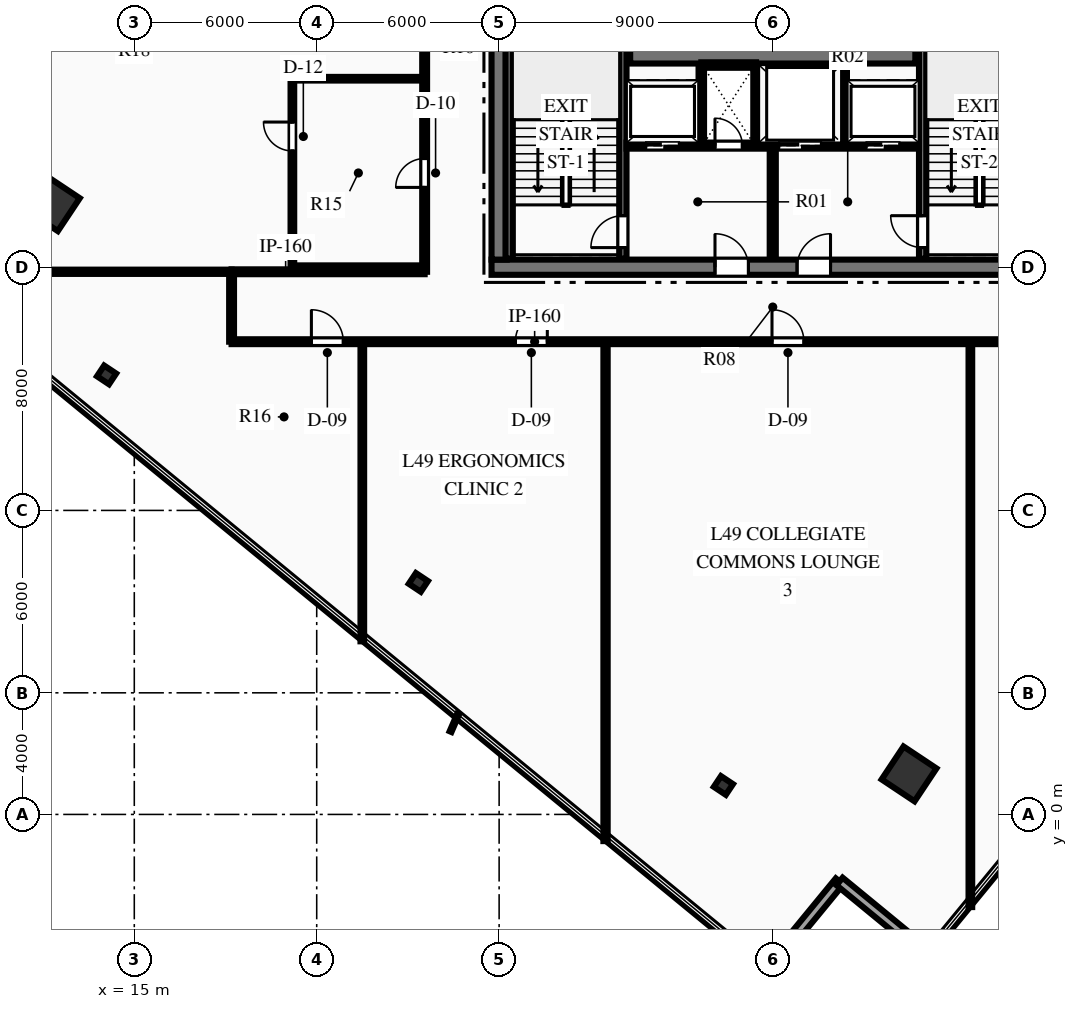
"""IFC4 building model, lengths in metres.
Left out: names, types, materials, properties, quantities, classifications, styles, units other than length and angle.
Written with IfcOpenShell. Run it as: python <this file> out.ifc"""

import sys

from ifc_helpers import new_model, si_unit, direction, frame, frame_2d, origin, origin_2d, place, context, subcontext, project, spatial, rectangle, hollow_rectangle, i_section, extrude, element, fill, save


model = new_model("IFC4")
c1 = context("Model", 3, precision=1e-05, world=origin(), true_north=direction((0.0, 1.0)))
c2 = subcontext(c1, "Body", "Model", "MODEL_VIEW")
j1 = project(units=[si_unit("LENGTHUNIT", "METRE"), si_unit("PLANEANGLEUNIT", "RADIAN")], contexts=[c1])
p1 = place(None, origin())
s1 = spatial("IfcSite", under=j1, at=p1, CompositionType="ELEMENT")
p2 = place(p1, origin())
s2 = spatial("IfcBuilding", under=s1, at=p2, CompositionType="ELEMENT")
p3 = place(p2, frame((0.0, 0.0, 198.45)))
s3 = spatial("IfcBuildingStorey", under=s2, at=p3, CompositionType="ELEMENT", Elevation=198.45)
p4 = place(p3, frame((26.75, 18.0, 0.0), z_axis=(0.0, 0.0, 1.0), x_axis=(1.0, 0.0, 0.0)))
e1 = element("IfcWall", 1, at=p4, inside=s3, PredefinedType="SHEAR", context=c2, shape_type="SweptSolid", body=[
    extrude(rectangle(XDim=18.5, YDim=0.5, at=frame_2d((9.25, 0.0))), origin(), (0.0, 0.0, 1.0), 3.75),
])
p5 = place(p4, frame((7.35, 0.0, 0.0)))
e2 = element("IfcOpeningElement", 2, at=p5, cuts=e1, PredefinedType="OPENING", context=c2, shape_type="SweptSolid", body=[
    extrude(rectangle(XDim=1.1, YDim=2.15, at=frame_2d((0.55, 1.075))), frame((0.0, 0.26, 0.0), z_axis=(0.0, -1.0, 0.0), x_axis=(1.0, 0.0, 0.0)), (0.0, 0.0, 1.0), 0.52),
])
p6 = place(p4, frame((10.05, 0.0, 0.0)))
e3 = element("IfcOpeningElement", 3, at=p6, cuts=e1, PredefinedType="OPENING", context=c2, shape_type="SweptSolid", body=[
    extrude(rectangle(XDim=1.1, YDim=2.15, at=frame_2d((0.55, 1.075))), frame((0.0, 0.26, 0.0), z_axis=(0.0, -1.0, 0.0), x_axis=(1.0, 0.0, 0.0)), (0.0, 0.0, 1.0), 0.52),
])
p7 = place(p3, frame((27.0, 18.25, 0.0), z_axis=(0.0, 0.0, 1.0), x_axis=(0.0, 1.0, 0.0)))
e4 = element("IfcWall", 4, at=p7, inside=s3, PredefinedType="SHEAR", context=c2, shape_type="SweptSolid", body=[
    extrude(rectangle(XDim=15.5, YDim=0.5, at=frame_2d((7.75, 0.0))), origin(), (0.0, 0.0, 1.0), 3.75),
])
p8 = place(p7, frame((9.99, 0.0, 0.0)))
e5 = element("IfcOpeningElement", 5, at=p8, cuts=e4, PredefinedType="OPENING", context=c2, shape_type="SweptSolid", body=[
    extrude(rectangle(XDim=1.4, YDim=2.2, at=frame_2d((0.7, 1.1))), frame((0.0, 0.26, 0.0), z_axis=(0.0, -1.0, 0.0), x_axis=(1.0, 0.0, 0.0)), (0.0, 0.0, 1.0), 0.52),
])
p9 = place(p3, frame((31.31, 24.95, 0.0), z_axis=(0.0, 0.0, 1.0), x_axis=(1.0, 0.0, 0.0)))
e6 = element("IfcWall", 6, at=p9, inside=s3, PredefinedType="SHEAR", context=c2, shape_type="SweptSolid", body=[
    extrude(rectangle(XDim=9.38, YDim=0.5, at=frame_2d((4.69, 0.0))), origin(), (0.0, 0.0, 1.0), 3.75),
])
p10 = place(p3, frame((31.07, 18.28, 0.0), z_axis=(0.0, 0.0, 1.0), x_axis=(0.0, 1.0, 0.0)))
e7 = element("IfcWall", 7, at=p10, inside=s3, PredefinedType="SHEAR", context=c2, shape_type="SweptSolid", body=[
    extrude(rectangle(XDim=8.26, YDim=0.24, at=frame_2d((4.13, 0.0))), origin(), (0.0, 0.0, 1.0), 3.75),
])
p11 = place(p10, frame((0.365, 0.0, 0.0)))
e8 = element("IfcOpeningElement", 8, at=p11, cuts=e7, PredefinedType="OPENING", context=c2, shape_type="SweptSolid", body=[
    extrude(rectangle(XDim=1.05, YDim=2.15, at=frame_2d((0.525, 1.075))), frame((0.0, 0.13, 0.0), z_axis=(0.0, -1.0, 0.0), x_axis=(1.0, 0.0, 0.0)), (0.0, 0.0, 1.0), 0.26),
])
p12 = place(p3, frame((27.33, 18.28, 0.0), z_axis=(0.0, 0.0, 1.0), x_axis=(0.0, 1.0, 0.0)))
e9 = element("IfcWall", 9, at=p12, inside=s3, PredefinedType="SHEAR", context=c2, shape_type="SweptSolid", body=[
    extrude(rectangle(XDim=8.26, YDim=0.24, at=frame_2d((4.13, 0.0))), origin(), (0.0, 0.0, 1.0), 3.75),
])
p13 = place(p3, frame((40.93, 18.28, 0.0), z_axis=(0.0, 0.0, 1.0), x_axis=(0.0, 1.0, 0.0)))
e10 = element("IfcWall", 10, at=p13, inside=s3, PredefinedType="SHEAR", context=c2, shape_type="SweptSolid", body=[
    extrude(rectangle(XDim=8.26, YDim=0.24, at=frame_2d((4.13, 0.0))), origin(), (0.0, 0.0, 1.0), 3.75),
])
p14 = place(p13, frame((0.365, 0.0, 0.0)))
e11 = element("IfcOpeningElement", 11, at=p14, cuts=e10, PredefinedType="OPENING", context=c2, shape_type="SweptSolid", body=[
    extrude(rectangle(XDim=1.05, YDim=2.15, at=frame_2d((0.525, 1.075))), frame((0.0, 0.13, 0.0), z_axis=(0.0, -1.0, 0.0), x_axis=(1.0, 0.0, 0.0)), (0.0, 0.0, 1.0), 0.26),
])
for number, where, z_axis, x_axis in (
    (12, (40.483, 1.333, 0.0), (0.0, 0.0, 1.0), (0.554, 0.832, 0.0)),
    (13, (12.305, 20.09, 0.0), (0.0, 0.0, 1.0), (0.554, 0.832, 0.0)),
):
    element("IfcColumn", number, at=place(p3, frame(where, z_axis=z_axis, x_axis=x_axis)), inside=s3, PredefinedType="COLUMN", context=c2, shape_type="SweptSolid", body=[
        extrude(hollow_rectangle(XDim=1.3, YDim=1.3, WallThickness=0.06, at=origin_2d()), origin(), (0.0, 0.0, 1.0), 3.75),
    ])
for number, where, z_axis, x_axis in (
    (14, (14.088, 14.458, 0.0), (0.0, 0.0, 1.0), (0.554, 0.832, 0.0)),
    (15, (24.343, 7.631, 0.0), (0.0, 0.0, 1.0), (0.554, 0.832, 0.0)),
    (16, (34.377, 0.952, 0.0), (0.0, 0.0, 1.0), (0.554, 0.832, 0.0)),
):
    element("IfcColumn", number, at=place(p3, frame(where, z_axis=z_axis, x_axis=x_axis)), inside=s3, PredefinedType="COLUMN", context=c2, shape_type="SweptSolid", body=[
        extrude(i_section(OverallWidth=0.424, OverallDepth=0.474, WebThickness=0.048, FlangeThickness=0.077, at=origin_2d()), origin(), (0.0, 0.0, 1.0), 3.75),
    ])
p15 = place(p3, frame((38.197, -2.205, 0.0), z_axis=(0.0, 0.0, 1.0), x_axis=(-0.634743428491, -0.772722964579, 0.0)))
e17 = element("IfcWall", 17, at=p15, inside=s3, PredefinedType="STANDARD", context=c2, shape_type="SweptSolid", body=[
    extrude(rectangle(XDim=3.9, YDim=0.32, at=frame_2d((1.95, 0.0))), origin(), (0.0, 0.0, 1.0), 3.47),
])
p16 = place(p3, frame((41.211, -4.68, 0.0), z_axis=(0.0, 0.0, 1.0), x_axis=(-0.77274818591, 0.634712723343, 0.0)))
e18 = element("IfcWall", 18, at=p16, inside=s3, PredefinedType="STANDARD", context=c2, shape_type="SweptSolid", body=[
    extrude(rectangle(XDim=3.9, YDim=0.32, at=frame_2d((1.95, 0.0))), origin(), (0.0, 0.0, 1.0), 3.47),
])
p17 = place(p3, frame((36.0, 18.28, 0.0), z_axis=(0.0, 0.0, 1.0), x_axis=(0.0, 1.0, 0.0)))
e19 = element("IfcWall", 19, at=p17, inside=s3, PredefinedType="PARTITIONING", context=c2, shape_type="SweptSolid", body=[
    extrude(rectangle(XDim=3.77, YDim=0.2, at=frame_2d((1.885, 0.0))), origin(), (0.0, 0.0, 1.0), 3.47),
])
p18 = place(p3, frame((31.19, 22.0, 0.0), z_axis=(0.0, 0.0, 1.0), x_axis=(1.0, 0.0, 0.0)))
e20 = element("IfcWall", 20, at=p18, inside=s3, PredefinedType="PARTITIONING", context=c2, shape_type="SweptSolid", body=[
    extrude(rectangle(XDim=4.69, YDim=0.2, at=frame_2d((2.345, 0.0))), origin(), (0.0, 0.0, 1.0), 3.47),
])
p19 = place(p18, frame((2.91, 0.0, 0.0)))
e21 = element("IfcOpeningElement", 21, at=p19, cuts=e20, PredefinedType="OPENING", context=c2, shape_type="SweptSolid", body=[
    extrude(rectangle(XDim=0.9, YDim=2.15, at=frame_2d((0.45, 1.075))), frame((0.0, 0.11, 0.0), z_axis=(0.0, -1.0, 0.0), x_axis=(1.0, 0.0, 0.0)), (0.0, 0.0, 1.0), 0.22),
])
p20 = place(p18, frame((0.635, 0.0, 0.0)))
e22 = element("IfcOpeningElement", 22, at=p20, cuts=e20, PredefinedType="OPENING", context=c2, shape_type="SweptSolid", body=[
    extrude(rectangle(XDim=1.1, YDim=2.15, at=frame_2d((0.55, 1.075))), frame((0.0, 0.11, 0.0), z_axis=(0.0, -1.0, 0.0), x_axis=(1.0, 0.0, 0.0)), (0.0, 0.0, 1.0), 0.22),
])
p21 = place(p3, frame((36.12, 22.0, 0.0), z_axis=(0.0, 0.0, 1.0), x_axis=(1.0, 0.0, 0.0)))
e23 = element("IfcWall", 23, at=p21, inside=s3, PredefinedType="PARTITIONING", context=c2, shape_type="SweptSolid", body=[
    extrude(rectangle(XDim=4.69, YDim=0.2, at=frame_2d((2.345, 0.0))), origin(), (0.0, 0.0, 1.0), 3.47),
])
p22 = place(p21, frame((2.955, 0.0, 0.0)))
e24 = element("IfcOpeningElement", 24, at=p22, cuts=e23, PredefinedType="OPENING", context=c2, shape_type="SweptSolid", body=[
    extrude(rectangle(XDim=1.1, YDim=2.15, at=frame_2d((0.55, 1.075))), frame((0.0, 0.11, 0.0), z_axis=(0.0, -1.0, 0.0), x_axis=(1.0, 0.0, 0.0)), (0.0, 0.0, 1.0), 0.22),
])
p23 = place(p21, frame((0.08, 0.0, 0.0)))
e25 = element("IfcOpeningElement", 25, at=p23, cuts=e23, PredefinedType="OPENING", context=c2, shape_type="SweptSolid", body=[
    extrude(rectangle(XDim=1.4, YDim=2.2, at=frame_2d((0.7, 1.1))), frame((0.0, 0.11, 0.0), z_axis=(0.0, -1.0, 0.0), x_axis=(1.0, 0.0, 0.0)), (0.0, 0.0, 1.0), 0.22),
])
for number, where, z_axis, x_axis in (
    (26, (33.65, 22.05, 0.0), (0.0, 0.0, 1.0), (0.0, 1.0, 0.0)),
    (27, (35.45, 22.05, 0.0), (0.0, 0.0, 1.0), (0.0, 1.0, 0.0)),
):
    element("IfcWall", number, at=place(p3, frame(where, z_axis=z_axis, x_axis=x_axis)), inside=s3, PredefinedType="PARTITIONING", context=c2, shape_type="SweptSolid", body=[
        extrude(rectangle(XDim=2.6, YDim=0.18, at=frame_2d((1.3, 0.0))), origin(), (0.0, 0.0, 1.0), 3.47),
    ])
p24 = place(p3, frame((33.65, 24.65, 0.0), z_axis=(0.0, 0.0, 1.0), x_axis=(1.0, 0.0, 0.0)))
e28 = element("IfcWall", 28, at=p24, inside=s3, PredefinedType="PARTITIONING", context=c2, shape_type="SweptSolid", body=[
    extrude(rectangle(XDim=1.8, YDim=0.18, at=frame_2d((0.9, 0.0))), origin(), (0.0, 0.0, 1.0), 3.47),
])
p25 = place(p3, frame((38.35, 22.05, 0.0), z_axis=(0.0, 0.0, 1.0), x_axis=(0.0, 1.0, 0.0)))
e29 = element("IfcWall", 29, at=p25, inside=s3, PredefinedType="PARTITIONING", context=c2, shape_type="SweptSolid", body=[
    extrude(rectangle(XDim=2.6, YDim=0.18, at=frame_2d((1.3, 0.0))), origin(), (0.0, 0.0, 1.0), 3.47),
])
p26 = place(p3, frame((18.2, 15.55, 0.0), z_axis=(0.0, 0.0, 1.0), x_axis=(1.0, 0.0, 0.0)))
e30 = element("IfcWall", 30, at=p26, inside=s3, PredefinedType="PARTITIONING", context=c2, shape_type="SweptSolid", body=[
    extrude(rectangle(XDim=35.6, YDim=0.16, at=frame_2d((17.8, 0.0))), origin(), (0.0, 0.0, 1.0), 2.849),
])
p27 = place(p26, frame((2.625, 0.0, 0.0)))
e31 = element("IfcOpeningElement", 31, at=p27, cuts=e30, PredefinedType="OPENING", context=c2, shape_type="SweptSolid", body=[
    extrude(rectangle(XDim=1.05, YDim=2.15, at=frame_2d((0.525, 1.075))), frame((0.0, 0.09, 0.0), z_axis=(0.0, -1.0, 0.0), x_axis=(1.0, 0.0, 0.0)), (0.0, 0.0, 1.0), 0.18),
])
p28 = place(p26, frame((9.335, 0.0, 0.0)))
e32 = element("IfcOpeningElement", 32, at=p28, cuts=e30, PredefinedType="OPENING", context=c2, shape_type="SweptSolid", body=[
    extrude(rectangle(XDim=1.05, YDim=2.15, at=frame_2d((0.525, 1.075))), frame((0.0, 0.09, 0.0), z_axis=(0.0, -1.0, 0.0), x_axis=(1.0, 0.0, 0.0)), (0.0, 0.0, 1.0), 0.18),
])
p29 = place(p26, frame((17.775, 0.0, 0.0)))
e33 = element("IfcOpeningElement", 33, at=p29, cuts=e30, PredefinedType="OPENING", context=c2, shape_type="SweptSolid", body=[
    extrude(rectangle(XDim=1.05, YDim=2.15, at=frame_2d((0.525, 1.075))), frame((0.0, 0.09, 0.0), z_axis=(0.0, -1.0, 0.0), x_axis=(1.0, 0.0, 0.0)), (0.0, 0.0, 1.0), 0.18),
])
p30 = place(p26, frame((26.055, 0.0, 0.0)))
e34 = element("IfcOpeningElement", 34, at=p30, cuts=e30, PredefinedType="OPENING", context=c2, shape_type="SweptSolid", body=[
    extrude(rectangle(XDim=1.05, YDim=2.15, at=frame_2d((0.525, 1.075))), frame((0.0, 0.09, 0.0), z_axis=(0.0, -1.0, 0.0), x_axis=(1.0, 0.0, 0.0)), (0.0, 0.0, 1.0), 0.18),
])
p31 = place(p26, frame((32.265, 0.0, 0.0)))
e35 = element("IfcOpeningElement", 35, at=p31, cuts=e30, PredefinedType="OPENING", context=c2, shape_type="SweptSolid", body=[
    extrude(rectangle(XDim=1.05, YDim=2.15, at=frame_2d((0.525, 1.075))), frame((0.0, 0.09, 0.0), z_axis=(0.0, -1.0, 0.0), x_axis=(1.0, 0.0, 0.0)), (0.0, 0.0, 1.0), 0.18),
])
p32 = place(p3, frame((18.2, 17.85, 0.0), z_axis=(0.0, 0.0, 1.0), x_axis=(1.0, 0.0, 0.0)))
e36 = element("IfcWall", 36, at=p32, inside=s3, PredefinedType="PARTITIONING", context=c2, shape_type="SweptSolid", body=[
    extrude(rectangle(XDim=6.35, YDim=0.16, at=frame_2d((3.175, 0.0))), origin(), (0.0, 0.0, 1.0), 3.47),
])
p33 = place(p3, frame((24.55, 17.85, 0.0), z_axis=(0.0, 0.0, 1.0), x_axis=(0.0, 1.0, 0.0)))
e37 = element("IfcWall", 37, at=p33, inside=s3, PredefinedType="PARTITIONING", context=c2, shape_type="SweptSolid", body=[
    extrude(rectangle(XDim=16.3, YDim=0.16, at=frame_2d((8.15, 0.0))), origin(), (0.0, 0.0, 1.0), 3.47),
])
p34 = place(p33, frame((2.775, 0.0, 0.0)))
e38 = element("IfcOpeningElement", 38, at=p34, cuts=e37, PredefinedType="OPENING", context=c2, shape_type="SweptSolid", body=[
    extrude(rectangle(XDim=0.95, YDim=2.15, at=frame_2d((0.475, 1.075))), frame((0.0, 0.09, 0.0), z_axis=(0.0, -1.0, 0.0), x_axis=(1.0, 0.0, 0.0)), (0.0, 0.0, 1.0), 0.18),
])
p35 = place(p33, frame((8.729, 0.0, 0.0)))
e39 = element("IfcOpeningElement", 39, at=p35, cuts=e37, PredefinedType="OPENING", context=c2, shape_type="SweptSolid", body=[
    extrude(rectangle(XDim=1.05, YDim=2.15, at=frame_2d((0.525, 1.075))), frame((0.0, 0.09, 0.0), z_axis=(0.0, -1.0, 0.0), x_axis=(1.0, 0.0, 0.0)), (0.0, 0.0, 1.0), 0.18),
])
p36 = place(p3, frame((18.2, 15.55, 0.0), z_axis=(0.0, 0.0, 1.0), x_axis=(0.0, 1.0, 0.0)))
e40 = element("IfcWall", 40, at=p36, inside=s3, PredefinedType="PARTITIONING", context=c2, shape_type="SweptSolid", body=[
    extrude(rectangle(XDim=2.3, YDim=0.16, at=frame_2d((1.15, 0.0))), origin(), (0.0, 0.0, 1.0), 3.47),
])
p37 = place(p3, frame((7.701, 17.85, 0.0), z_axis=(0.0, 0.0, 1.0), x_axis=(1.0, 0.0, 0.0)))
e41 = element("IfcWall", 41, at=p37, inside=s3, PredefinedType="PARTITIONING", context=c2, shape_type="SweptSolid", body=[
    extrude(rectangle(XDim=10.499, YDim=0.14, at=frame_2d((5.25, 0.0))), origin(), (0.0, 0.0, 1.0), 3.47),
])
p38 = place(p3, frame((22.5, 5.694, 0.0), z_axis=(0.0, 0.0, 1.0), x_axis=(0.0, 1.0, 0.0)))
e42 = element("IfcWall", 42, at=p38, inside=s3, PredefinedType="PARTITIONING", context=c2, shape_type="SweptSolid", body=[
    extrude(rectangle(XDim=9.856, YDim=0.12, at=frame_2d((4.928, 0.0))), origin(), (0.0, 0.0, 1.0), 3.47),
])
p39 = place(p3, frame((30.5, -0.877, 0.0), z_axis=(0.0, 0.0, 1.0), x_axis=(0.0, 1.0, 0.0)))
e43 = element("IfcWall", 43, at=p39, inside=s3, PredefinedType="PARTITIONING", context=c2, shape_type="SweptSolid", body=[
    extrude(rectangle(XDim=16.427, YDim=0.14, at=frame_2d((8.214, 0.0))), origin(), (0.0, 0.0, 1.0), 3.47),
])
p40 = place(p3, frame((42.5, -3.047, 0.0), z_axis=(0.0, 0.0, 1.0), x_axis=(0.0, 1.0, 0.0)))
e44 = element("IfcWall", 44, at=p40, inside=s3, PredefinedType="PARTITIONING", context=c2, shape_type="SweptSolid", body=[
    extrude(rectangle(XDim=18.597, YDim=0.12, at=frame_2d((9.299, 0.0))), origin(), (0.0, 0.0, 1.0), 3.47),
])
p41 = place(p3, frame((20.2, 18.0, 0.0), z_axis=(0.0, 0.0, 1.0), x_axis=(1.0, 0.0, 0.0)))
e45 = element("IfcWall", 45, at=p41, inside=s3, PredefinedType="PARTITIONING", context=c2, shape_type="SweptSolid", body=[
    extrude(rectangle(XDim=4.35, YDim=0.12, at=frame_2d((2.175, 0.0))), origin(), (0.0, 0.0, 1.0), 3.47),
])
p42 = place(p3, frame((20.2, 18.0, 0.0), z_axis=(0.0, 0.0, 1.0), x_axis=(0.0, 1.0, 0.0)))
e46 = element("IfcWall", 46, at=p42, inside=s3, PredefinedType="PARTITIONING", context=c2, shape_type="SweptSolid", body=[
    extrude(rectangle(XDim=6.2, YDim=0.12, at=frame_2d((3.1, 0.0))), origin(), (0.0, 0.0, 1.0), 3.47),
])
p43 = place(p42, frame((3.825, 0.0, 0.0)))
e47 = element("IfcOpeningElement", 47, at=p43, cuts=e46, PredefinedType="OPENING", context=c2, shape_type="SweptSolid", body=[
    extrude(rectangle(XDim=0.95, YDim=2.15, at=frame_2d((0.475, 1.075))), frame((0.0, 0.07, 0.0), z_axis=(0.0, -1.0, 0.0), x_axis=(1.0, 0.0, 0.0)), (0.0, 0.0, 1.0), 0.14),
])
p44 = place(p3, frame((20.2, 24.2, 0.0), z_axis=(0.0, 0.0, 1.0), x_axis=(1.0, 0.0, 0.0)))
e48 = element("IfcWall", 48, at=p44, inside=s3, PredefinedType="PARTITIONING", context=c2, shape_type="SweptSolid", body=[
    extrude(rectangle(XDim=4.35, YDim=0.12, at=frame_2d((2.175, 0.0))), origin(), (0.0, 0.0, 1.0), 3.47),
])
p45 = place(p11, origin())
e49 = element("IfcDoor", 49, at=p45, inside=s3, OperationType="SINGLE_SWING_LEFT", PredefinedType="DOOR", context=c2, shape_type="SweptSolid", body=[
    extrude(rectangle(XDim=1.05, YDim=2.15, at=frame_2d((0.525, 1.075))), frame((0.0, 0.025, 0.0), z_axis=(0.0, -1.0, 0.0), x_axis=(1.0, 0.0, 0.0)), (0.0, 0.0, 1.0), 0.05),
])
fill(e8, e49)
p46 = place(p14, origin())
e50 = element("IfcDoor", 50, at=p46, inside=s3, OperationType="SINGLE_SWING_RIGHT", PredefinedType="DOOR", context=c2, shape_type="SweptSolid", body=[
    extrude(rectangle(XDim=1.05, YDim=2.15, at=frame_2d((0.525, 1.075))), frame((0.0, 0.025, 0.0), z_axis=(0.0, -1.0, 0.0), x_axis=(1.0, 0.0, 0.0)), (0.0, 0.0, 1.0), 0.05),
])
fill(e11, e50)
p47 = place(p5, origin())
e51 = element("IfcDoor", 51, at=p47, inside=s3, OperationType="SINGLE_SWING_LEFT", PredefinedType="DOOR", context=c2, shape_type="SweptSolid", body=[
    extrude(rectangle(XDim=1.1, YDim=2.15, at=frame_2d((0.55, 1.075))), frame((0.0, 0.025, 0.0), z_axis=(0.0, -1.0, 0.0), x_axis=(1.0, 0.0, 0.0)), (0.0, 0.0, 1.0), 0.05),
])
fill(e2, e51)
p48 = place(p6, origin())
e52 = element("IfcDoor", 52, at=p48, inside=s3, OperationType="SINGLE_SWING_RIGHT", PredefinedType="DOOR", context=c2, shape_type="SweptSolid", body=[
    extrude(rectangle(XDim=1.1, YDim=2.15, at=frame_2d((0.55, 1.075))), frame((0.0, 0.025, 0.0), z_axis=(0.0, -1.0, 0.0), x_axis=(1.0, 0.0, 0.0)), (0.0, 0.0, 1.0), 0.05),
])
fill(e3, e52)
p49 = place(p19, origin())
e53 = element("IfcDoor", 53, at=p49, inside=s3, OperationType="SINGLE_SWING_LEFT", PredefinedType="DOOR", context=c2, shape_type="SweptSolid", body=[
    extrude(rectangle(XDim=0.9, YDim=2.15, at=frame_2d((0.45, 1.075))), frame((0.0, 0.025, 0.0), z_axis=(0.0, -1.0, 0.0), x_axis=(1.0, 0.0, 0.0)), (0.0, 0.0, 1.0), 0.05),
])
fill(e21, e53)
p50 = place(p34, origin())
e54 = element("IfcDoor", 54, at=p50, inside=s3, OperationType="SINGLE_SWING_LEFT", PredefinedType="DOOR", context=c2, shape_type="SweptSolid", body=[
    extrude(rectangle(XDim=0.95, YDim=2.15, at=frame_2d((0.475, 1.075))), frame((0.0, 0.025, 0.0), z_axis=(0.0, -1.0, 0.0), x_axis=(1.0, 0.0, 0.0)), (0.0, 0.0, 1.0), 0.05),
])
fill(e38, e54)
p51 = place(p43, origin())
e55 = element("IfcDoor", 55, at=p51, inside=s3, OperationType="SINGLE_SWING_RIGHT", PredefinedType="DOOR", context=c2, shape_type="SweptSolid", body=[
    extrude(rectangle(XDim=0.95, YDim=2.15, at=frame_2d((0.475, 1.075))), frame((0.0, 0.025, 0.0), z_axis=(0.0, -1.0, 0.0), x_axis=(1.0, 0.0, 0.0)), (0.0, 0.0, 1.0), 0.05),
])
fill(e47, e55)
p52 = place(p27, origin())
e56 = element("IfcDoor", 56, at=p52, inside=s3, OperationType="SINGLE_SWING_LEFT", PredefinedType="DOOR", context=c2, shape_type="SweptSolid", body=[
    extrude(rectangle(XDim=1.05, YDim=2.15, at=frame_2d((0.525, 1.075))), frame((0.0, 0.025, 0.0), z_axis=(0.0, -1.0, 0.0), x_axis=(1.0, 0.0, 0.0)), (0.0, 0.0, 1.0), 0.05),
])
fill(e31, e56)
p53 = place(p28, origin())
e57 = element("IfcDoor", 57, at=p53, inside=s3, OperationType="SINGLE_SWING_RIGHT", PredefinedType="DOOR", context=c2, shape_type="SweptSolid", body=[
    extrude(rectangle(XDim=1.05, YDim=2.15, at=frame_2d((0.525, 1.075))), frame((0.0, 0.025, 0.0), z_axis=(0.0, -1.0, 0.0), x_axis=(1.0, 0.0, 0.0)), (0.0, 0.0, 1.0), 0.05),
])
fill(e32, e57)
p54 = place(p29, origin())
e58 = element("IfcDoor", 58, at=p54, inside=s3, OperationType="SINGLE_SWING_LEFT", PredefinedType="DOOR", context=c2, shape_type="SweptSolid", body=[
    extrude(rectangle(XDim=1.05, YDim=2.15, at=frame_2d((0.525, 1.075))), frame((0.0, 0.025, 0.0), z_axis=(0.0, -1.0, 0.0), x_axis=(1.0, 0.0, 0.0)), (0.0, 0.0, 1.0), 0.05),
])
fill(e33, e58)
p55 = place(p20, origin())
e59 = element("IfcDoor", 59, at=p55, inside=s3, OperationType="SLIDING_TO_LEFT", PredefinedType="DOOR", context=c2, shape_type="SweptSolid", body=[
    extrude(rectangle(XDim=1.1, YDim=2.15, at=frame_2d((0.55, 1.075))), frame((0.0, 0.025, 0.0), z_axis=(0.0, -1.0, 0.0), x_axis=(1.0, 0.0, 0.0)), (0.0, 0.0, 1.0), 0.05),
])
fill(e22, e59)
p56 = place(p22, origin())
e60 = element("IfcDoor", 60, at=p56, inside=s3, OperationType="SLIDING_TO_LEFT", PredefinedType="DOOR", context=c2, shape_type="SweptSolid", body=[
    extrude(rectangle(XDim=1.1, YDim=2.15, at=frame_2d((0.55, 1.075))), frame((0.0, 0.025, 0.0), z_axis=(0.0, -1.0, 0.0), x_axis=(1.0, 0.0, 0.0)), (0.0, 0.0, 1.0), 0.05),
])
fill(e24, e60)
p57 = place(p23, origin())
e61 = element("IfcDoor", 61, at=p57, inside=s3, OperationType="SLIDING_TO_LEFT", PredefinedType="DOOR", context=c2, shape_type="SweptSolid", body=[
    extrude(rectangle(XDim=1.4, YDim=2.2, at=frame_2d((0.7, 1.1))), frame((0.0, 0.025, 0.0), z_axis=(0.0, -1.0, 0.0), x_axis=(1.0, 0.0, 0.0)), (0.0, 0.0, 1.0), 0.05),
])
fill(e25, e61)
save(model, sys.argv[1])
